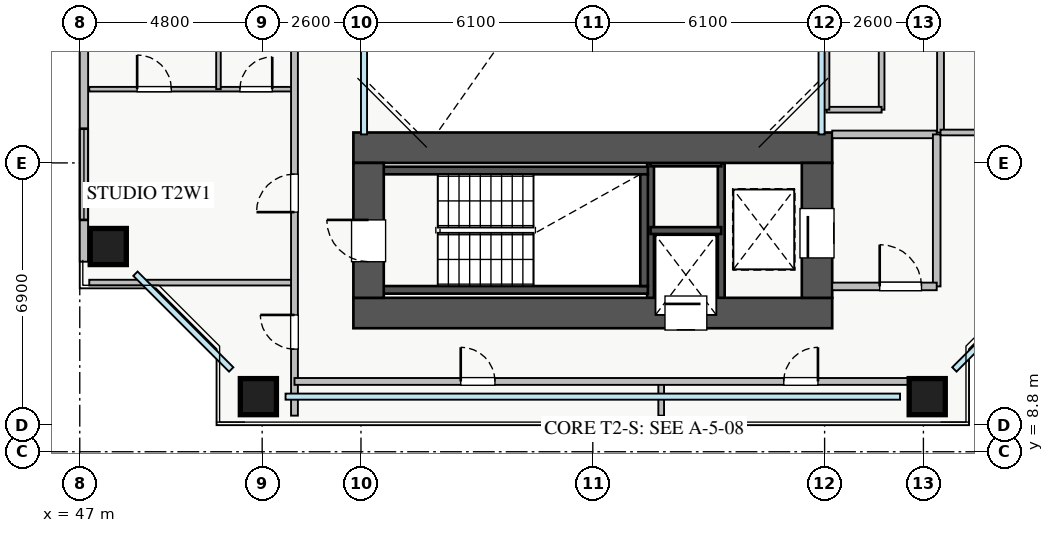
"""IFC4 building model, lengths in metres.
Left out: names, types, materials, properties, quantities, classifications, styles, units other than length and angle.
Written with IfcOpenShell. Run it as: python <this file> out.ifc"""

import sys

from ifc_helpers import new_model, si_unit, direction, frame, frame_2d, origin, origin_2d, place, context, subcontext, project, spatial, rectangle, extrude, source, transform, mapped, element, fill, save


model = new_model("IFC4")
c1 = context("Model", 3, precision=1e-05, world=origin(), true_north=direction((0.0, 1.0)))
c2 = subcontext(c1, "Body", "Model", "MODEL_VIEW")
j1 = project(units=[si_unit("LENGTHUNIT", "METRE"), si_unit("PLANEANGLEUNIT", "RADIAN")], contexts=[c1])
p1 = place(None, origin())
s1 = spatial("IfcSite", under=j1, at=p1, CompositionType="ELEMENT")
p2 = place(p1, origin())
s2 = spatial("IfcBuilding", under=s1, at=p2, CompositionType="ELEMENT")
p3 = place(p2, frame((0.0, 0.0, 36.0)))
s3 = spatial("IfcBuildingStorey", under=s2, at=p3, CompositionType="ELEMENT", Elevation=36.0)
for number, where, z_axis, x_axis in (
    (1, (62.02, 12.45, 0.0), (0.0, 0.0, 1.0), (0.0, 1.0, 0.0)),
    (2, (63.88, 12.45, 0.0), (0.0, 0.0, 1.0), (0.0, 1.0, 0.0)),
):
    element("IfcWall", number, at=place(p3, frame(where, z_axis=z_axis, x_axis=x_axis)), inside=s3, PredefinedType="SHEAR", context=c2, shape_type="SweptSolid", body=[
        extrude(rectangle(XDim=3.95, YDim=0.18, at=frame_2d((1.975, 0.0))), origin(), (0.0, 0.0, 1.0), 3.07),
    ])
for number, where, z_axis, x_axis in (
    (3, (62.02, 14.62, 0.0), (0.0, 0.0, 1.0), (1.0, 0.0, 0.0)),
    (4, (62.02, 16.4, 0.0), (0.0, 0.0, 1.0), (1.0, 0.0, 0.0)),
):
    element("IfcWall", number, at=place(p3, frame(where, z_axis=z_axis, x_axis=x_axis)), inside=s3, PredefinedType="SHEAR", context=c2, shape_type="SweptSolid", body=[
        extrude(rectangle(XDim=1.86, YDim=0.18, at=frame_2d((0.93, 0.0))), origin(), (0.0, 0.0, 1.0), 3.07),
    ])
for number, where, z_axis, x_axis in (
    (5, (54.8, 13.06, 0.0), (0.0, 0.0, 1.0), (1.0, 0.0, 0.0)),
    (6, (54.8, 16.2, 0.0), (0.0, 0.0, 1.0), (1.0, 0.0, 0.0)),
):
    element("IfcWall", number, at=place(p3, frame(where, z_axis=z_axis, x_axis=x_axis)), inside=s3, PredefinedType="SHEAR", context=c2, shape_type="SweptSolid", body=[
        extrude(rectangle(XDim=7.15, YDim=0.2, at=frame_2d((3.575, 0.0))), origin(), (0.0, 0.0, 1.0), 3.25),
    ])
p4 = place(p3, frame((61.85, 13.16, 0.0), z_axis=(0.0, 0.0, 1.0), x_axis=(0.0, 1.0, 0.0)))
e7 = element("IfcWall", 7, at=p4, inside=s3, PredefinedType="SHEAR", context=c2, shape_type="SweptSolid", body=[
    extrude(rectangle(XDim=2.94, YDim=0.2, at=frame_2d((1.47, 0.0))), origin(), (0.0, 0.0, 1.0), 3.25),
])
p5 = place(p3, frame((54.2, 12.45, 0.0), z_axis=(0.0, 0.0, 1.0), x_axis=(1.0, 0.0, 0.0)))
e8 = element("IfcWall", 8, at=p5, inside=s3, PredefinedType="SHEAR", context=c2, shape_type="SweptSolid", body=[
    extrude(rectangle(XDim=12.6, YDim=0.8, at=frame_2d((6.3, 0.0))), origin(), (0.0, 0.0, 1.0), 3.25),
])
p6 = place(p5, frame((8.2, 0.0, 0.0)))
e9 = element("IfcOpeningElement", 9, at=p6, cuts=e8, PredefinedType="OPENING", context=c2, shape_type="SweptSolid", body=[
    extrude(rectangle(XDim=1.1, YDim=2.05, at=frame_2d((0.55, 1.025))), frame((0.0, 0.41, 0.0), z_axis=(0.0, -1.0, 0.0), x_axis=(1.0, 0.0, 0.0)), (0.0, 0.0, 1.0), 0.82),
])
p7 = place(p3, frame((54.2, 16.8, 0.0), z_axis=(0.0, 0.0, 1.0), x_axis=(1.0, 0.0, 0.0)))
e10 = element("IfcWall", 10, at=p7, inside=s3, PredefinedType="SHEAR", context=c2, shape_type="SweptSolid", body=[
    extrude(rectangle(XDim=12.6, YDim=0.8, at=frame_2d((6.3, 0.0))), origin(), (0.0, 0.0, 1.0), 3.25),
])
p8 = place(p3, frame((54.6, 12.85, 0.0), z_axis=(0.0, 0.0, 1.0), x_axis=(0.0, 1.0, 0.0)))
e11 = element("IfcWall", 11, at=p8, inside=s3, PredefinedType="SHEAR", context=c2, shape_type="SweptSolid", body=[
    extrude(rectangle(XDim=3.55, YDim=0.8, at=frame_2d((1.775, 0.0))), origin(), (0.0, 0.0, 1.0), 3.25),
])
p9 = place(p8, frame((0.95, 0.0, 0.0)))
e12 = element("IfcOpeningElement", 12, at=p9, cuts=e11, PredefinedType="OPENING", context=c2, shape_type="SweptSolid", body=[
    extrude(rectangle(XDim=1.1, YDim=2.05, at=frame_2d((0.55, 1.025))), frame((0.0, 0.41, 0.0), z_axis=(0.0, -1.0, 0.0), x_axis=(1.0, 0.0, 0.0)), (0.0, 0.0, 1.0), 0.82),
])
p10 = place(p3, frame((66.4, 12.85, 0.0), z_axis=(0.0, 0.0, 1.0), x_axis=(0.0, 1.0, 0.0)))
e13 = element("IfcWall", 13, at=p10, inside=s3, PredefinedType="SHEAR", context=c2, shape_type="SweptSolid", body=[
    extrude(rectangle(XDim=3.55, YDim=0.8, at=frame_2d((1.775, 0.0))), origin(), (0.0, 0.0, 1.0), 3.25),
])
p11 = place(p10, frame((1.05, 0.0, 0.0)))
e14 = element("IfcOpeningElement", 14, at=p11, cuts=e13, PredefinedType="OPENING", context=c2, shape_type="SweptSolid", body=[
    extrude(rectangle(XDim=1.3, YDim=2.05, at=frame_2d((0.65, 1.025))), frame((0.0, 0.41, 0.0), z_axis=(0.0, -1.0, 0.0), x_axis=(1.0, 0.0, 0.0)), (0.0, 0.0, 1.0), 0.82),
])
m1 = source(origin(), c2, "Body", "SweptSolid", [
    extrude(rectangle(XDim=0.95, YDim=0.95, at=origin_2d()), origin(), (0.0, 0.0, 1.0), 3.25),
])
for number, where, z_axis, x_axis in (
    (15, (51.7, 10.25, 0.0), (0.0, 0.0, 1.0), (1.0, 0.0, 0.0)),
    (16, (69.3, 10.25, 0.0), (0.0, 0.0, 1.0), (1.0, 0.0, 0.0)),
    (17, (47.75, 14.2, 0.0), (0.0, 0.0, 1.0), (1.0, 0.0, 0.0)),
):
    element("IfcColumn", number, at=place(p3, frame(where, z_axis=z_axis, x_axis=x_axis)), inside=s3, PredefinedType="COLUMN", context=c2, shape_type="MappedRepresentation", body=[
        mapped(m1, transform((0.0, 0.0, 0.0), x_axis=(1.0, 0.0, 0.0), y_axis=(0.0, 1.0, 0.0), z_axis=(0.0, 0.0, 1.0), scale=1.0)),
    ])
p12 = place(p3, frame((47.11, 13.8, 0.0), z_axis=(0.0, 0.0, 1.0), x_axis=(0.0, 1.0, 0.0)))
e18 = element("IfcWall", 18, at=p12, inside=s3, PredefinedType="STANDARD", context=c2, shape_type="SweptSolid", body=[
    extrude(rectangle(XDim=18.4, YDim=0.22, at=frame_2d((9.2, 0.0))), origin(), (0.0, 0.0, 1.0), 2.61),
])
p13 = place(p12, frame((1.1, 0.0, 0.9)))
e19 = element("IfcOpeningElement", 19, at=p13, cuts=e18, PredefinedType="OPENING", context=c2, shape_type="SweptSolid", body=[
    extrude(rectangle(XDim=2.4, YDim=1.48, at=frame_2d((1.2, 0.74))), frame((0.0, 0.12, 0.0), z_axis=(0.0, -1.0, 0.0), x_axis=(1.0, 0.0, 0.0)), (0.0, 0.0, 1.0), 0.24),
])
p14 = place(p12, frame((15.05, 0.0, 0.9)))
e20 = element("IfcOpeningElement", 20, at=p14, cuts=e18, PredefinedType="OPENING", context=c2, shape_type="SweptSolid", body=[
    extrude(rectangle(XDim=2.1, YDim=1.48, at=frame_2d((1.05, 0.74))), frame((0.0, 0.12, 0.0), z_axis=(0.0, -1.0, 0.0), x_axis=(1.0, 0.0, 0.0)), (0.0, 0.0, 1.0), 0.24),
])
p15 = place(p12, frame((9.435, 0.0, 0.9)))
e21 = element("IfcOpeningElement", 21, at=p15, cuts=e18, PredefinedType="OPENING", context=c2, shape_type="SweptSolid", body=[
    extrude(rectangle(XDim=0.9, YDim=1.2, at=frame_2d((0.45, 0.6))), frame((0.0, 0.12, 0.0), z_axis=(0.0, -1.0, 0.0), x_axis=(1.0, 0.0, 0.0)), (0.0, 0.0, 1.0), 0.24),
])
p16 = place(p3, frame((66.8, 17.15, 0.0), z_axis=(0.0, 0.0, 1.0), x_axis=(1.0, 0.0, 0.0)))
e22 = element("IfcWall", 22, at=p16, inside=s3, PredefinedType="PARTITIONING", context=c2, shape_type="SweptSolid", body=[
    extrude(rectangle(XDim=2.75, YDim=0.2, at=frame_2d((1.375, 0.0))), origin(), (0.0, 0.0, 1.0), 3.07),
])
p17 = place(p3, frame((69.55, 13.15, 0.0), z_axis=(0.0, 0.0, 1.0), x_axis=(0.0, 1.0, 0.0)))
e23 = element("IfcWall", 23, at=p17, inside=s3, PredefinedType="PARTITIONING", context=c2, shape_type="SweptSolid", body=[
    extrude(rectangle(XDim=4.0, YDim=0.2, at=frame_2d((2.0, 0.0))), origin(), (0.0, 0.0, 1.0), 2.615),
])
p18 = place(p3, frame((66.8, 13.15, 0.0), z_axis=(0.0, 0.0, 1.0), x_axis=(1.0, 0.0, 0.0)))
e24 = element("IfcWall", 24, at=p18, inside=s3, PredefinedType="PARTITIONING", context=c2, shape_type="SweptSolid", body=[
    extrude(rectangle(XDim=2.75, YDim=0.2, at=frame_2d((1.375, 0.0))), origin(), (0.0, 0.0, 1.0), 3.07),
])
p19 = place(p18, frame((1.25, 0.0, 0.0)))
e25 = element("IfcOpeningElement", 25, at=p19, cuts=e24, PredefinedType="OPENING", context=c2, shape_type="SweptSolid", body=[
    extrude(rectangle(XDim=1.1, YDim=2.05, at=frame_2d((0.55, 1.025))), frame((0.0, 0.11, 0.0), z_axis=(0.0, -1.0, 0.0), x_axis=(1.0, 0.0, 0.0)), (0.0, 0.0, 1.0), 0.22),
])
p20 = place(p3, frame((47.25, 13.25, 0.0), z_axis=(0.0, 0.0, 1.0), x_axis=(1.0, 0.0, 0.0)))
e26 = element("IfcWall", 26, at=p20, inside=s3, PredefinedType="PARTITIONING", context=c2, shape_type="SweptSolid", body=[
    extrude(rectangle(XDim=5.4, YDim=0.15, at=frame_2d((2.7, 0.0))), origin(), (0.0, 0.0, 1.0), 3.07),
])
p21 = place(p3, frame((47.25, 18.34, 0.0), z_axis=(0.0, 0.0, 1.0), x_axis=(1.0, 0.0, 0.0)))
e27 = element("IfcWall", 27, at=p21, inside=s3, PredefinedType="PLUMBINGWALL", context=c2, shape_type="SweptSolid", body=[
    extrude(rectangle(XDim=5.4, YDim=0.12, at=frame_2d((2.7, 0.0))), origin(), (0.0, 0.0, 1.0), 2.715),
])
p22 = place(p21, frame((1.26, 0.0, 0.0)))
e28 = element("IfcOpeningElement", 28, at=p22, cuts=e27, PredefinedType="OPENING", context=c2, shape_type="SweptSolid", body=[
    extrude(rectangle(XDim=0.9, YDim=2.05, at=frame_2d((0.45, 1.025))), frame((0.0, 0.07, 0.0), z_axis=(0.0, -1.0, 0.0), x_axis=(1.0, 0.0, 0.0)), (0.0, 0.0, 1.0), 0.14),
])
p23 = place(p21, frame((3.965, 0.0, 0.0)))
e29 = element("IfcOpeningElement", 29, at=p23, cuts=e27, PredefinedType="OPENING", context=c2, shape_type="SweptSolid", body=[
    extrude(rectangle(XDim=0.85, YDim=2.05, at=frame_2d((0.425, 1.025))), frame((0.0, 0.07, 0.0), z_axis=(0.0, -1.0, 0.0), x_axis=(1.0, 0.0, 0.0)), (0.0, 0.0, 1.0), 0.14),
])
p24 = place(p3, frame((50.65, 18.34, 0.0), z_axis=(0.0, 0.0, 1.0), x_axis=(0.0, 1.0, 0.0)))
e30 = element("IfcWall", 30, at=p24, inside=s3, PredefinedType="PLUMBINGWALL", context=c2, shape_type="SweptSolid", body=[
    extrude(rectangle(XDim=4.66, YDim=0.12, at=frame_2d((2.33, 0.0))), origin(), (0.0, 0.0, 1.0), 3.07),
])
p25 = place(p3, frame((52.65, 9.75, 0.0), z_axis=(0.0, 0.0, 1.0), x_axis=(0.0, 1.0, 0.0)))
e31 = element("IfcWall", 31, at=p25, inside=s3, PredefinedType="PARTITIONING", context=c2, shape_type="SweptSolid", body=[
    extrude(rectangle(XDim=26.5, YDim=0.18, at=frame_2d((13.25, 0.0))), origin(), (0.0, 0.0, 1.0), 3.07),
])
p26 = place(p25, frame((23.85, 0.0, 0.0)))
e32 = element("IfcOpeningElement", 32, at=p26, cuts=e31, PredefinedType="OPENING", context=c2, shape_type="SweptSolid", body=[
    extrude(rectangle(XDim=0.9, YDim=2.05, at=frame_2d((0.45, 1.025))), frame((0.0, 0.1, 0.0), z_axis=(0.0, -1.0, 0.0), x_axis=(1.0, 0.0, 0.0)), (0.0, 0.0, 1.0), 0.2),
])
p27 = place(p25, frame((1.75, 0.0, 0.0)))
e33 = element("IfcOpeningElement", 33, at=p27, cuts=e31, PredefinedType="OPENING", context=c2, shape_type="SweptSolid", body=[
    extrude(rectangle(XDim=0.9, YDim=2.05, at=frame_2d((0.45, 1.025))), frame((0.0, 0.1, 0.0), z_axis=(0.0, -1.0, 0.0), x_axis=(1.0, 0.0, 0.0)), (0.0, 0.0, 1.0), 0.2),
])
p28 = place(p25, frame((5.355, 0.0, 0.0)))
e34 = element("IfcOpeningElement", 34, at=p28, cuts=e31, PredefinedType="OPENING", context=c2, shape_type="SweptSolid", body=[
    extrude(rectangle(XDim=1.0, YDim=2.05, at=frame_2d((0.5, 1.025))), frame((0.0, 0.1, 0.0), z_axis=(0.0, -1.0, 0.0), x_axis=(1.0, 0.0, 0.0)), (0.0, 0.0, 1.0), 0.2),
])
p29 = place(p25, frame((15.195, 0.0, 0.0)))
e35 = element("IfcOpeningElement", 35, at=p29, cuts=e31, PredefinedType="OPENING", context=c2, shape_type="SweptSolid", body=[
    extrude(rectangle(XDim=1.0, YDim=2.05, at=frame_2d((0.5, 1.025))), frame((0.0, 0.1, 0.0), z_axis=(0.0, -1.0, 0.0), x_axis=(1.0, 0.0, 0.0)), (0.0, 0.0, 1.0), 0.2),
])
p30 = place(p3, frame((69.65, 17.2, 0.0), z_axis=(0.0, 0.0, 1.0), x_axis=(0.0, 1.0, 0.0)))
e36 = element("IfcWall", 36, at=p30, inside=s3, PredefinedType="PARTITIONING", context=c2, shape_type="SweptSolid", body=[
    extrude(rectangle(XDim=11.6, YDim=0.18, at=frame_2d((5.8, 0.0))), origin(), (0.0, 0.0, 1.0), 3.07),
])
p31 = place(p30, frame((2.26, 0.0, 0.0)))
e37 = element("IfcOpeningElement", 37, at=p31, cuts=e36, PredefinedType="OPENING", context=c2, shape_type="SweptSolid", body=[
    extrude(rectangle(XDim=1.0, YDim=2.05, at=frame_2d((0.5, 1.025))), frame((0.0, 0.1, 0.0), z_axis=(0.0, -1.0, 0.0), x_axis=(1.0, 0.0, 0.0)), (0.0, 0.0, 1.0), 0.2),
])
p32 = place(p3, frame((69.65, 17.2, 0.0), z_axis=(0.0, 0.0, 1.0), x_axis=(1.0, 0.0, 0.0)))
e38 = element("IfcWall", 38, at=p32, inside=s3, PredefinedType="PARTITIONING", context=c2, shape_type="SweptSolid", body=[
    extrude(rectangle(XDim=4.1, YDim=0.15, at=frame_2d((2.05, 0.0))), origin(), (0.0, 0.0, 1.0), 3.07),
])
p33 = place(p3, frame((68.1, 17.8, 0.0), z_axis=(0.0, 0.0, 1.0), x_axis=(0.0, 1.0, 0.0)))
e39 = element("IfcWall", 39, at=p33, inside=s3, PredefinedType="PARTITIONING", context=c2, shape_type="SweptSolid", body=[
    extrude(rectangle(XDim=9.8, YDim=0.15, at=frame_2d((4.9, 0.0))), origin(), (0.0, 0.0, 1.0), 3.07),
])
p34 = place(p33, frame((4.3, 0.0, 0.0)))
e40 = element("IfcOpeningElement", 40, at=p34, cuts=e39, PredefinedType="OPENING", context=c2, shape_type="SweptSolid", body=[
    extrude(rectangle(XDim=0.9, YDim=2.05, at=frame_2d((0.45, 1.025))), frame((0.0, 0.085, 0.0), z_axis=(0.0, -1.0, 0.0), x_axis=(1.0, 0.0, 0.0)), (0.0, 0.0, 1.0), 0.17),
])
p35 = place(p3, frame((66.65, 17.8, 0.0), z_axis=(0.0, 0.0, 1.0), x_axis=(1.0, 0.0, 0.0)))
e41 = element("IfcWall", 41, at=p35, inside=s3, PredefinedType="PARTITIONING", context=c2, shape_type="SweptSolid", body=[
    extrude(rectangle(XDim=1.45, YDim=0.15, at=frame_2d((0.725, 0.0))), origin(), (0.0, 0.0, 1.0), 3.07),
])
p36 = place(p3, frame((66.65, 17.8, 0.0), z_axis=(0.0, 0.0, 1.0), x_axis=(0.0, 1.0, 0.0)))
e42 = element("IfcWall", 42, at=p36, inside=s3, PredefinedType="PARTITIONING", context=c2, shape_type="SweptSolid", body=[
    extrude(rectangle(XDim=9.8, YDim=0.15, at=frame_2d((4.9, 0.0))), origin(), (0.0, 0.0, 1.0), 2.665),
])
for number, where, z_axis, x_axis in (
    (43, (62.3, 9.75, 0.0), (0.0, 0.0, 1.0), (0.0, 1.0, 0.0)),
    (44, (69.65, 9.75, 0.0), (0.0, 0.0, 1.0), (0.0, 1.0, 0.0)),
):
    element("IfcWall", number, at=place(p3, frame(where, z_axis=z_axis, x_axis=x_axis)), inside=s3, PredefinedType="PARTITIONING", context=c2, shape_type="SweptSolid", body=[
        extrude(rectangle(XDim=0.9, YDim=0.15, at=frame_2d((0.45, 0.0))), origin(), (0.0, 0.0, 1.0), 3.07),
    ])
p37 = place(p3, frame((52.65, 10.65, 0.0), z_axis=(0.0, 0.0, 1.0), x_axis=(1.0, 0.0, 0.0)))
e45 = element("IfcWall", 45, at=p37, inside=s3, PredefinedType="PARTITIONING", context=c2, shape_type="SweptSolid", body=[
    extrude(rectangle(XDim=17.0, YDim=0.18, at=frame_2d((8.5, 0.0))), origin(), (0.0, 0.0, 1.0), 3.07),
])
p38 = place(p37, frame((4.375, 0.0, 0.0)))
e46 = element("IfcOpeningElement", 46, at=p38, cuts=e45, PredefinedType="OPENING", context=c2, shape_type="SweptSolid", body=[
    extrude(rectangle(XDim=0.9, YDim=2.05, at=frame_2d((0.45, 1.025))), frame((0.0, 0.1, 0.0), z_axis=(0.0, -1.0, 0.0), x_axis=(1.0, 0.0, 0.0)), (0.0, 0.0, 1.0), 0.2),
])
p39 = place(p37, frame((12.875, 0.0, 0.0)))
e47 = element("IfcOpeningElement", 47, at=p39, cuts=e45, PredefinedType="OPENING", context=c2, shape_type="SweptSolid", body=[
    extrude(rectangle(XDim=0.9, YDim=2.05, at=frame_2d((0.45, 1.025))), frame((0.0, 0.1, 0.0), z_axis=(0.0, -1.0, 0.0), x_axis=(1.0, 0.0, 0.0)), (0.0, 0.0, 1.0), 0.2),
])
m2 = source(origin(), c2, "Body", "SweptSolid", [
    extrude(rectangle(XDim=2.4, YDim=1.48, at=frame_2d((1.2, 0.74))), frame((0.0, 0.03, 0.0), z_axis=(0.0, -1.0, 0.0), x_axis=(1.0, 0.0, 0.0)), (0.0, 0.0, 1.0), 0.06),
])
p40 = place(p13, origin())
e48 = element("IfcWindow", 48, at=p40, inside=s3, PartitioningType="TRIPLE_PANEL_VERTICAL", PredefinedType="WINDOW", context=c2, shape_type="MappedRepresentation", body=[
    mapped(m2, transform((0.0, 0.0, 0.0), x_axis=(1.0, 0.0, 0.0), y_axis=(0.0, 1.0, 0.0), z_axis=(0.0, 0.0, 1.0), scale=1.0)),
])
fill(e19, e48)
m3 = source(origin(), c2, "Body", "SweptSolid", [
    extrude(rectangle(XDim=1.3, YDim=2.05, at=frame_2d((0.65, 1.025))), frame((0.0, 0.025, 0.0), z_axis=(0.0, -1.0, 0.0), x_axis=(1.0, 0.0, 0.0)), (0.0, 0.0, 1.0), 0.05),
])
p41 = place(p11, origin())
e49 = element("IfcDoor", 49, at=p41, inside=s3, OperationType="SLIDING_TO_RIGHT", PredefinedType="DOOR", context=c2, shape_type="MappedRepresentation", body=[
    mapped(m3, transform((0.0, 0.0, 0.0), x_axis=(1.0, 0.0, 0.0), y_axis=(0.0, 1.0, 0.0), z_axis=(0.0, 0.0, 1.0), scale=1.0)),
])
fill(e14, e49)
m4 = source(origin(), c2, "Body", "SweptSolid", [
    extrude(rectangle(XDim=1.1, YDim=2.05, at=frame_2d((0.55, 1.025))), frame((0.0, 0.025, 0.0), z_axis=(0.0, -1.0, 0.0), x_axis=(1.0, 0.0, 0.0)), (0.0, 0.0, 1.0), 0.05),
])
p42 = place(p9, origin())
e50 = element("IfcDoor", 50, at=p42, inside=s3, OperationType="SINGLE_SWING_RIGHT", PredefinedType="DOOR", context=c2, shape_type="MappedRepresentation", body=[
    mapped(m4, transform((0.0, 0.0, 0.0), x_axis=(1.0, 0.0, 0.0), y_axis=(0.0, 1.0, 0.0), z_axis=(0.0, 0.0, 1.0), scale=1.0)),
])
fill(e12, e50)
p43 = place(p6, origin())
e51 = element("IfcDoor", 51, at=p43, inside=s3, OperationType="SLIDING_TO_RIGHT", PredefinedType="DOOR", context=c2, shape_type="MappedRepresentation", body=[
    mapped(m4, transform((0.0, 0.0, 0.0), x_axis=(1.0, 0.0, 0.0), y_axis=(0.0, 1.0, 0.0), z_axis=(0.0, 0.0, 1.0), scale=1.0)),
])
fill(e9, e51)
p44 = place(p19, origin())
e52 = element("IfcDoor", 52, at=p44, inside=s3, OperationType="SINGLE_SWING_LEFT", PredefinedType="DOOR", context=c2, shape_type="MappedRepresentation", body=[
    mapped(m4, transform((0.0, 0.0, 0.0), x_axis=(1.0, 0.0, 0.0), y_axis=(0.0, 1.0, 0.0), z_axis=(0.0, 0.0, 1.0), scale=1.0)),
])
fill(e25, e52)
m5 = source(origin(), c2, "Body", "SweptSolid", [
    extrude(rectangle(XDim=0.9, YDim=2.05, at=frame_2d((0.45, 1.025))), frame((0.0, 0.025, 0.0), z_axis=(0.0, -1.0, 0.0), x_axis=(1.0, 0.0, 0.0)), (0.0, 0.0, 1.0), 0.05),
])
p45 = place(p22, origin())
e53 = element("IfcDoor", 53, at=p45, inside=s3, OperationType="SINGLE_SWING_LEFT", PredefinedType="DOOR", context=c2, shape_type="MappedRepresentation", body=[
    mapped(m5, transform((0.0, 0.0, 0.0), x_axis=(1.0, 0.0, 0.0), y_axis=(0.0, 1.0, 0.0), z_axis=(0.0, 0.0, 1.0), scale=1.0)),
])
fill(e28, e53)
m6 = source(origin(), c2, "Body", "SweptSolid", [
    extrude(rectangle(XDim=0.85, YDim=2.05, at=frame_2d((0.425, 1.025))), frame((0.0, 0.025, 0.0), z_axis=(0.0, -1.0, 0.0), x_axis=(1.0, 0.0, 0.0)), (0.0, 0.0, 1.0), 0.05),
])
p46 = place(p23, origin())
e54 = element("IfcDoor", 54, at=p46, inside=s3, OperationType="SINGLE_SWING_RIGHT", PredefinedType="DOOR", context=c2, shape_type="MappedRepresentation", body=[
    mapped(m6, transform((0.0, 0.0, 0.0), x_axis=(1.0, 0.0, 0.0), y_axis=(0.0, 1.0, 0.0), z_axis=(0.0, 0.0, 1.0), scale=1.0)),
])
fill(e29, e54)
p47 = place(p27, origin())
e55 = element("IfcDoor", 55, at=p47, inside=s3, OperationType="SINGLE_SWING_RIGHT", PredefinedType="DOOR", context=c2, shape_type="MappedRepresentation", body=[
    mapped(m5, transform((0.0, 0.0, 0.0), x_axis=(1.0, 0.0, 0.0), y_axis=(0.0, 1.0, 0.0), z_axis=(0.0, 0.0, 1.0), scale=1.0)),
])
fill(e33, e55)
m7 = source(origin(), c2, "Body", "SweptSolid", [
    extrude(rectangle(XDim=1.0, YDim=2.05, at=frame_2d((0.5, 1.025))), frame((0.0, 0.025, 0.0), z_axis=(0.0, -1.0, 0.0), x_axis=(1.0, 0.0, 0.0)), (0.0, 0.0, 1.0), 0.05),
])
p48 = place(p28, origin())
e56 = element("IfcDoor", 56, at=p48, inside=s3, OperationType="SINGLE_SWING_LEFT", PredefinedType="DOOR", context=c2, shape_type="MappedRepresentation", body=[
    mapped(m7, transform((0.0, 0.0, 0.0), x_axis=(1.0, 0.0, 0.0), y_axis=(0.0, 1.0, 0.0), z_axis=(0.0, 0.0, 1.0), scale=1.0)),
])
fill(e34, e56)
p49 = place(p38, origin())
e57 = element("IfcDoor", 57, at=p49, inside=s3, OperationType="SINGLE_SWING_LEFT", PredefinedType="DOOR", context=c2, shape_type="MappedRepresentation", body=[
    mapped(m5, transform((0.0, 0.0, 0.0), x_axis=(1.0, 0.0, 0.0), y_axis=(0.0, 1.0, 0.0), z_axis=(0.0, 0.0, 1.0), scale=1.0)),
])
fill(e46, e57)
p50 = place(p39, origin())
e58 = element("IfcDoor", 58, at=p50, inside=s3, OperationType="SINGLE_SWING_RIGHT", PredefinedType="DOOR", context=c2, shape_type="MappedRepresentation", body=[
    mapped(m5, transform((0.0, 0.0, 0.0), x_axis=(1.0, 0.0, 0.0), y_axis=(0.0, 1.0, 0.0), z_axis=(0.0, 0.0, 1.0), scale=1.0)),
])
fill(e47, e58)
save(model, sys.argv[1])
